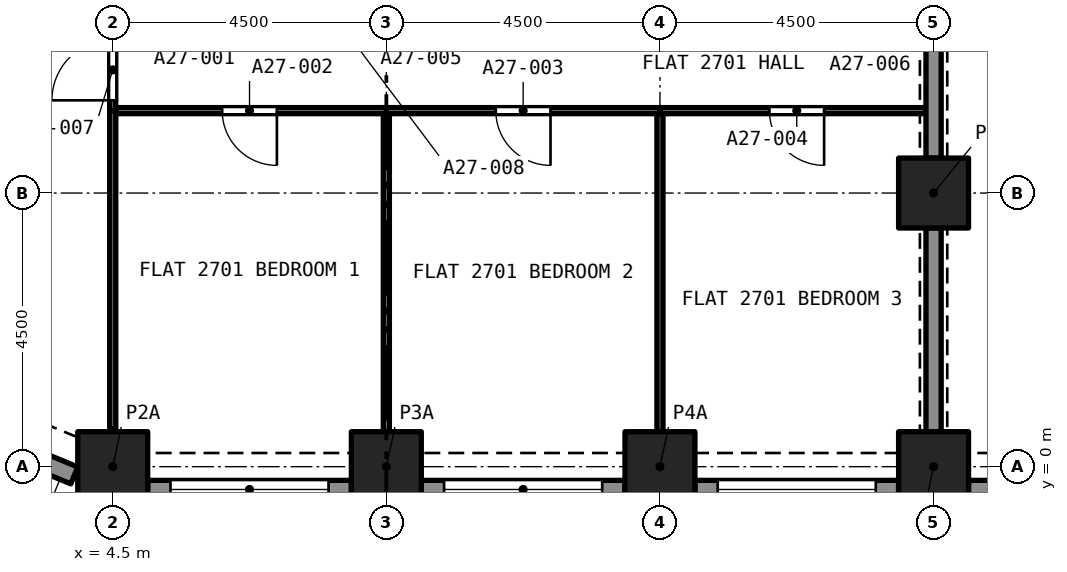
"""IFC4 building model, lengths in metres.
Left out: names, types, materials, properties, quantities, classifications, styles, units other than length and angle.
Written with IfcOpenShell. Run it as: python <this file> out.ifc"""

import sys

from ifc_helpers import new_model, si_unit, direction, frame, frame_2d, origin, origin_2d, place, context, subcontext, project, spatial, rectangle, extrude, element, fill, save


model = new_model("IFC4")
c1 = context("Model", 3, precision=1e-05, world=origin(), true_north=direction((0.0, 1.0)))
c2 = subcontext(c1, "Body", "Model", "MODEL_VIEW")
j1 = project(units=[si_unit("LENGTHUNIT", "METRE"), si_unit("PLANEANGLEUNIT", "RADIAN")], contexts=[c1])
p1 = place(None, origin())
s1 = spatial("IfcSite", under=j1, at=p1, CompositionType="ELEMENT")
p2 = place(p1, origin())
s2 = spatial("IfcBuilding", under=s1, at=p2, CompositionType="ELEMENT")
p3 = place(p2, frame((0.0, 0.0, 99.2)))
s3 = spatial("IfcBuildingStorey", under=s2, at=p3, CompositionType="ELEMENT", Elevation=99.2)
for number, where, z_axis, x_axis in (
    (1, (4.5, 0.0, 0.0), (0.0, 0.0, 1.0), (1.0, 0.0, 0.0)),
    (2, (9.0, 0.0, 0.0), (0.0, 0.0, 1.0), (1.0, 0.0, 0.0)),
    (3, (13.5, 0.0, 0.0), (0.0, 0.0, 1.0), (1.0, 0.0, 0.0)),
    (4, (18.0, 0.0, 0.0), (0.0, 0.0, 1.0), (1.0, 0.0, 0.0)),
    (5, (18.0, 4.5, 0.0), (0.0, 0.0, 1.0), (1.0, 0.0, 0.0)),
):
    element("IfcColumn", number, at=place(p3, frame(where, z_axis=z_axis, x_axis=x_axis)), inside=s3, PredefinedType="COLUMN", context=c2, shape_type="SweptSolid", body=[
        extrude(rectangle(XDim=1.15, YDim=1.15, at=origin_2d()), origin(), (0.0, 0.0, 1.0), 3.2),
    ])
p4 = place(p3, frame((3.868, -0.144, 0.0), z_axis=(0.0, 0.0, 1.0), x_axis=(-0.923862802911, 0.382723818695, 0.0)))
e6 = element("IfcWall", 6, at=p4, inside=s3, PredefinedType="SOLIDWALL", context=c2, shape_type="SweptSolid", body=[
    extrude(rectangle(XDim=2.164, YDim=0.3, at=frame_2d((1.082, 0.0))), origin(), (0.0, 0.0, 1.0), 3.2),
])
p5 = place(p4, frame((0.493, 0.0, 0.45)))
e7 = element("IfcOpeningElement", 7, at=p5, cuts=e6, PredefinedType="OPENING", context=c2, shape_type="SweptSolid", body=[
    extrude(rectangle(XDim=1.4, YDim=1.95, at=frame_2d((0.7, 0.975))), frame((0.0, 0.16, 0.0), z_axis=(0.0, -1.0, 0.0), x_axis=(1.0, 0.0, 0.0)), (0.0, 0.0, 1.0), 0.32),
])
p6 = place(p3, frame((8.425, -0.375, 0.0), z_axis=(0.0, 0.0, 1.0), x_axis=(-1.0, 0.0, 0.0)))
e8 = element("IfcWall", 8, at=p6, inside=s3, PredefinedType="SOLIDWALL", context=c2, shape_type="SweptSolid", body=[
    extrude(rectangle(XDim=3.35, YDim=0.3, at=frame_2d((1.675, 0.0))), origin(), (0.0, 0.0, 1.0), 3.2),
])
p7 = place(p6, frame((0.375, 0.0, 0.45)))
e9 = element("IfcOpeningElement", 9, at=p7, cuts=e8, PredefinedType="OPENING", context=c2, shape_type="SweptSolid", body=[
    extrude(rectangle(XDim=2.6, YDim=1.95, at=frame_2d((1.3, 0.975))), frame((0.0, 0.16, 0.0), z_axis=(0.0, -1.0, 0.0), x_axis=(1.0, 0.0, 0.0)), (0.0, 0.0, 1.0), 0.32),
])
p8 = place(p3, frame((12.925, -0.375, 0.0), z_axis=(0.0, 0.0, 1.0), x_axis=(-1.0, 0.0, 0.0)))
e10 = element("IfcWall", 10, at=p8, inside=s3, PredefinedType="SOLIDWALL", context=c2, shape_type="SweptSolid", body=[
    extrude(rectangle(XDim=3.35, YDim=0.3, at=frame_2d((1.675, 0.0))), origin(), (0.0, 0.0, 1.0), 3.2),
])
p9 = place(p8, frame((0.375, 0.0, 0.45)))
e11 = element("IfcOpeningElement", 11, at=p9, cuts=e10, PredefinedType="OPENING", context=c2, shape_type="SweptSolid", body=[
    extrude(rectangle(XDim=2.6, YDim=1.95, at=frame_2d((1.3, 0.975))), frame((0.0, 0.16, 0.0), z_axis=(0.0, -1.0, 0.0), x_axis=(1.0, 0.0, 0.0)), (0.0, 0.0, 1.0), 0.32),
])
p10 = place(p3, frame((17.425, -0.375, 0.0), z_axis=(0.0, 0.0, 1.0), x_axis=(-1.0, 0.0, 0.0)))
e12 = element("IfcWall", 12, at=p10, inside=s3, PredefinedType="SOLIDWALL", context=c2, shape_type="SweptSolid", body=[
    extrude(rectangle(XDim=3.35, YDim=0.3, at=frame_2d((1.675, 0.0))), origin(), (0.0, 0.0, 1.0), 3.2),
])
p11 = place(p10, frame((0.375, 0.0, 0.45)))
e13 = element("IfcOpeningElement", 13, at=p11, cuts=e12, PredefinedType="OPENING", context=c2, shape_type="SweptSolid", body=[
    extrude(rectangle(XDim=2.6, YDim=1.95, at=frame_2d((1.3, 0.975))), frame((0.0, 0.16, 0.0), z_axis=(0.0, -1.0, 0.0), x_axis=(1.0, 0.0, 0.0)), (0.0, 0.0, 1.0), 0.32),
])
p12 = place(p3, frame((21.925, -0.375, 0.0), z_axis=(0.0, 0.0, 1.0), x_axis=(-1.0, 0.0, 0.0)))
e14 = element("IfcWall", 14, at=p12, inside=s3, PredefinedType="SOLIDWALL", context=c2, shape_type="SweptSolid", body=[
    extrude(rectangle(XDim=3.35, YDim=0.3, at=frame_2d((1.675, 0.0))), origin(), (0.0, 0.0, 1.0), 3.2),
])
p13 = place(p12, frame((0.375, 0.0, 0.45)))
e15 = element("IfcOpeningElement", 15, at=p13, cuts=e14, PredefinedType="OPENING", context=c2, shape_type="SweptSolid", body=[
    extrude(rectangle(XDim=2.6, YDim=1.95, at=frame_2d((1.3, 0.975))), frame((0.0, 0.16, 0.0), z_axis=(0.0, -1.0, 0.0), x_axis=(1.0, 0.0, 0.0)), (0.0, 0.0, 1.0), 0.32),
])
p14 = place(p3, frame((9.0, 0.575, 0.0), z_axis=(0.0, 0.0, 1.0), x_axis=(0.0, 1.0, 0.0)))
e16 = element("IfcWall", 16, at=p14, inside=s3, PredefinedType="PARTITIONING", context=c2, shape_type="SweptSolid", body=[
    extrude(rectangle(XDim=5.23, YDim=0.1, at=frame_2d((2.615, 0.0))), origin(), (0.0, 0.0, 1.0), 2.9),
])
p15 = place(p3, frame((9.0, 5.855, 0.0), z_axis=(0.0, 0.0, 1.0), x_axis=(-1.0, 0.0, 0.0)))
e17 = element("IfcWall", 17, at=p15, inside=s3, PredefinedType="PARTITIONING", context=c2, shape_type="SweptSolid", body=[
    extrude(rectangle(XDim=4.45, YDim=0.1, at=frame_2d((2.225, 0.0))), origin(), (0.0, 0.0, 1.0), 2.9),
])
p16 = place(p15, frame((1.8, 0.0, 0.0)))
e18 = element("IfcOpeningElement", 18, at=p16, cuts=e17, PredefinedType="OPENING", context=c2, shape_type="SweptSolid", body=[
    extrude(rectangle(XDim=0.9, YDim=2.1, at=frame_2d((0.45, 1.05))), frame((0.0, 0.06, 0.0), z_axis=(0.0, -1.0, 0.0), x_axis=(1.0, 0.0, 0.0)), (0.0, 0.0, 1.0), 0.12),
])
p17 = place(p3, frame((4.5, 0.622, 0.0), z_axis=(0.0, 0.0, 1.0), x_axis=(0.0, 1.0, 0.0)))
e19 = element("IfcWall", 19, at=p17, inside=s3, PredefinedType="PARTITIONING", context=c2, shape_type="SweptSolid", body=[
    extrude(rectangle(XDim=5.233, YDim=0.1, at=frame_2d((2.616, 0.0))), origin(), (0.0, 0.0, 1.0), 2.9),
])
p18 = place(p3, frame((13.5, 0.575, 0.0), z_axis=(0.0, 0.0, 1.0), x_axis=(0.0, 1.0, 0.0)))
e20 = element("IfcWall", 20, at=p18, inside=s3, PredefinedType="PARTITIONING", context=c2, shape_type="SweptSolid", body=[
    extrude(rectangle(XDim=5.23, YDim=0.1, at=frame_2d((2.615, 0.0))), origin(), (0.0, 0.0, 1.0), 2.9),
])
p19 = place(p3, frame((13.5, 5.855, 0.0), z_axis=(0.0, 0.0, 1.0), x_axis=(-1.0, 0.0, 0.0)))
e21 = element("IfcWall", 21, at=p19, inside=s3, PredefinedType="PARTITIONING", context=c2, shape_type="SweptSolid", body=[
    extrude(rectangle(XDim=4.5, YDim=0.1, at=frame_2d((2.25, 0.0))), origin(), (0.0, 0.0, 1.0), 2.9),
])
p20 = place(p19, frame((1.8, 0.0, 0.0)))
e22 = element("IfcOpeningElement", 22, at=p20, cuts=e21, PredefinedType="OPENING", context=c2, shape_type="SweptSolid", body=[
    extrude(rectangle(XDim=0.9, YDim=2.1, at=frame_2d((0.45, 1.05))), frame((0.0, 0.06, 0.0), z_axis=(0.0, -1.0, 0.0), x_axis=(1.0, 0.0, 0.0)), (0.0, 0.0, 1.0), 0.12),
])
p21 = place(p3, frame((17.875, 5.855, 0.0), z_axis=(0.0, 0.0, 1.0), x_axis=(-1.0, 0.0, 0.0)))
e23 = element("IfcWall", 23, at=p21, inside=s3, PredefinedType="PARTITIONING", context=c2, shape_type="SweptSolid", body=[
    extrude(rectangle(XDim=4.375, YDim=0.1, at=frame_2d((2.188, 0.0))), origin(), (0.0, 0.0, 1.0), 2.9),
])
p22 = place(p21, frame((1.675, 0.0, 0.0)))
e24 = element("IfcOpeningElement", 24, at=p22, cuts=e23, PredefinedType="OPENING", context=c2, shape_type="SweptSolid", body=[
    extrude(rectangle(XDim=0.9, YDim=2.1, at=frame_2d((0.45, 1.05))), frame((0.0, 0.06, 0.0), z_axis=(0.0, -1.0, 0.0), x_axis=(1.0, 0.0, 0.0)), (0.0, 0.0, 1.0), 0.12),
])
for number, where, z_axis, x_axis in (
    (25, (18.0, 5.075, 0.0), (0.0, 0.0, 1.0), (0.0, 1.0, 0.0)),
    (26, (18.0, 0.575, 0.0), (0.0, 0.0, 1.0), (0.0, 1.0, 0.0)),
):
    element("IfcWall", number, at=place(p3, frame(where, z_axis=z_axis, x_axis=x_axis)), inside=s3, PredefinedType="PARTITIONING", context=c2, shape_type="SweptSolid", body=[
        extrude(rectangle(XDim=3.35, YDim=0.25, at=frame_2d((1.675, 0.0))), origin(), (0.0, 0.0, 1.0), 2.38),
    ])
p23 = place(p3, frame((4.5, 5.855, 0.0), z_axis=(0.0, 0.0, 1.0), x_axis=(0.0, 1.0, 0.0)))
e27 = element("IfcWall", 27, at=p23, inside=s3, PredefinedType="PARTITIONING", context=c2, shape_type="SweptSolid", body=[
    extrude(rectangle(XDim=1.34, YDim=0.1, at=frame_2d((0.67, 0.0))), origin(), (0.0, 0.0, 1.0), 2.9),
])
p24 = place(p23, frame((0.17, 0.0, 0.0)))
e28 = element("IfcOpeningElement", 28, at=p24, cuts=e27, PredefinedType="OPENING", context=c2, shape_type="SweptSolid", body=[
    extrude(rectangle(XDim=1.0, YDim=2.1, at=frame_2d((0.5, 1.05))), frame((0.0, 0.06, 0.0), z_axis=(0.0, -1.0, 0.0), x_axis=(1.0, 0.0, 0.0)), (0.0, 0.0, 1.0), 0.12),
])
p25 = place(p7, origin())
e29 = element("IfcWindow", 29, at=p25, inside=s3, PartitioningType="SINGLE_PANEL", PredefinedType="WINDOW", context=c2, shape_type="SweptSolid", body=[
    extrude(rectangle(XDim=2.6, YDim=1.95, at=frame_2d((1.3, 0.975))), frame((0.0, 0.03, 0.0), z_axis=(0.0, -1.0, 0.0), x_axis=(1.0, 0.0, 0.0)), (0.0, 0.0, 1.0), 0.06),
])
fill(e9, e29)
p26 = place(p9, origin())
e30 = element("IfcWindow", 30, at=p26, inside=s3, PartitioningType="SINGLE_PANEL", PredefinedType="WINDOW", context=c2, shape_type="SweptSolid", body=[
    extrude(rectangle(XDim=2.6, YDim=1.95, at=frame_2d((1.3, 0.975))), frame((0.0, 0.03, 0.0), z_axis=(0.0, -1.0, 0.0), x_axis=(1.0, 0.0, 0.0)), (0.0, 0.0, 1.0), 0.06),
])
fill(e11, e30)
p27 = place(p11, origin())
e31 = element("IfcWindow", 31, at=p27, inside=s3, PartitioningType="SINGLE_PANEL", PredefinedType="WINDOW", context=c2, shape_type="SweptSolid", body=[
    extrude(rectangle(XDim=2.6, YDim=1.95, at=frame_2d((1.3, 0.975))), frame((0.0, 0.03, 0.0), z_axis=(0.0, -1.0, 0.0), x_axis=(1.0, 0.0, 0.0)), (0.0, 0.0, 1.0), 0.06),
])
fill(e13, e31)
p28 = place(p16, origin())
e32 = element("IfcDoor", 32, at=p28, inside=s3, OperationType="SINGLE_SWING_RIGHT", PredefinedType="DOOR", context=c2, shape_type="SweptSolid", body=[
    extrude(rectangle(XDim=0.9, YDim=2.1, at=frame_2d((0.45, 1.05))), frame((0.0, 0.025, 0.0), z_axis=(0.0, -1.0, 0.0), x_axis=(1.0, 0.0, 0.0)), (0.0, 0.0, 1.0), 0.05),
])
fill(e18, e32)
p29 = place(p20, origin())
e33 = element("IfcDoor", 33, at=p29, inside=s3, OperationType="SINGLE_SWING_LEFT", PredefinedType="DOOR", context=c2, shape_type="SweptSolid", body=[
    extrude(rectangle(XDim=0.9, YDim=2.1, at=frame_2d((0.45, 1.05))), frame((0.0, 0.025, 0.0), z_axis=(0.0, -1.0, 0.0), x_axis=(1.0, 0.0, 0.0)), (0.0, 0.0, 1.0), 0.05),
])
fill(e22, e33)
p30 = place(p22, origin())
e34 = element("IfcDoor", 34, at=p30, inside=s3, OperationType="SINGLE_SWING_LEFT", PredefinedType="DOOR", context=c2, shape_type="SweptSolid", body=[
    extrude(rectangle(XDim=0.9, YDim=2.1, at=frame_2d((0.45, 1.05))), frame((0.0, 0.025, 0.0), z_axis=(0.0, -1.0, 0.0), x_axis=(1.0, 0.0, 0.0)), (0.0, 0.0, 1.0), 0.05),
])
fill(e24, e34)
p31 = place(p24, origin())
e35 = element("IfcDoor", 35, at=p31, inside=s3, OperationType="SINGLE_SWING_RIGHT", PredefinedType="DOOR", context=c2, shape_type="SweptSolid", body=[
    extrude(rectangle(XDim=1.0, YDim=2.1, at=frame_2d((0.5, 1.05))), frame((0.0, 0.025, 0.0), z_axis=(0.0, -1.0, 0.0), x_axis=(1.0, 0.0, 0.0)), (0.0, 0.0, 1.0), 0.05),
])
fill(e28, e35)
save(model, sys.argv[1])
